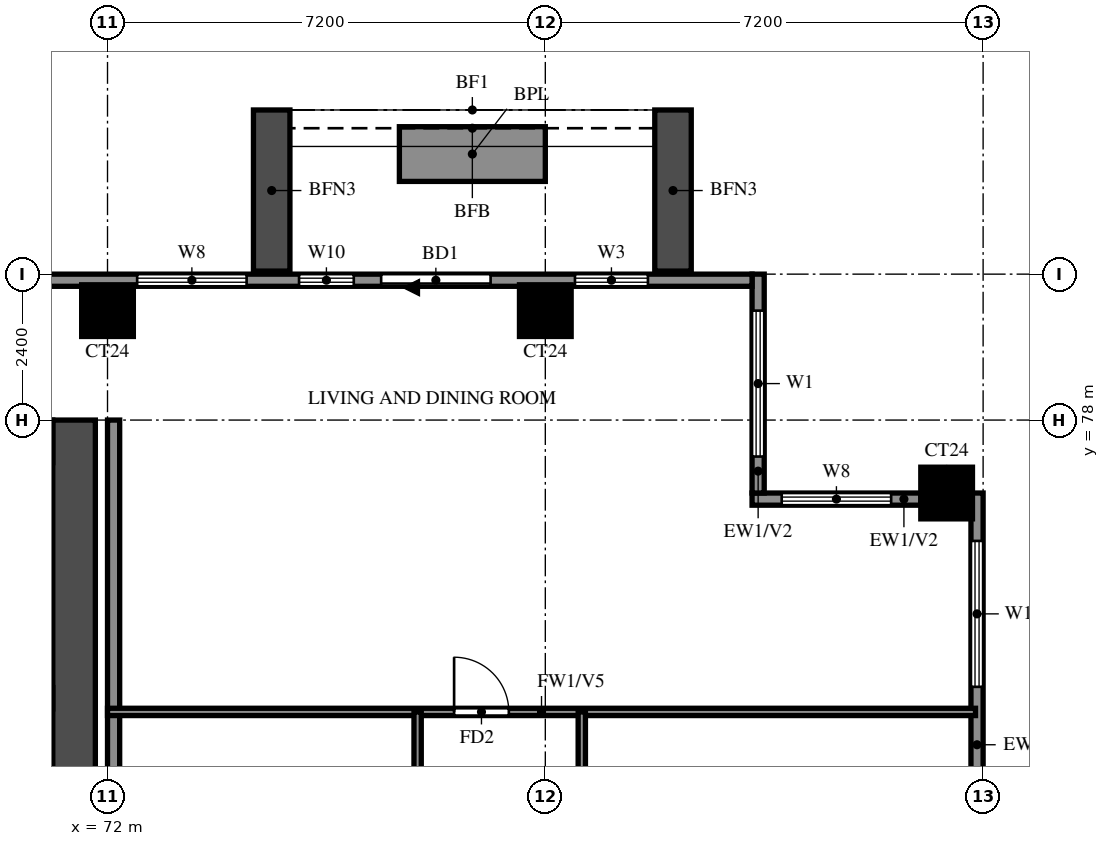
"""IFC4 building model, lengths in metres.
Left out: names, types, materials, properties, quantities, classifications, styles, units other than length and angle.
Written with IfcOpenShell. Run it as: python <this file> out.ifc"""

import sys

from ifc_helpers import new_model, si_unit, direction, frame, frame_2d, origin, origin_2d, place, context, subcontext, project, spatial, rectangle, extrude, source, transform, mapped, element, fill, save


model = new_model("IFC4")
c1 = context("Model", 3, precision=1e-05, world=origin(), true_north=direction((0.0, 1.0)))
c2 = subcontext(c1, "Body", "Model", "MODEL_VIEW")
j1 = project(units=[si_unit("LENGTHUNIT", "METRE"), si_unit("PLANEANGLEUNIT", "RADIAN")], contexts=[c1])
p1 = place(None, origin())
s1 = spatial("IfcSite", under=j1, at=p1, CompositionType="ELEMENT")
p2 = place(p1, origin())
s2 = spatial("IfcBuilding", under=s1, at=p2, CompositionType="ELEMENT")
p3 = place(p2, frame((0.0, 0.0, 171.0)))
s3 = spatial("IfcBuildingStorey", under=s2, at=p3, CompositionType="ELEMENT", Elevation=171.0)
m1 = source(origin(), c2, "Body", "SweptSolid", [
    extrude(rectangle(XDim=0.85, YDim=0.85, at=origin_2d()), origin(), (0.0, 0.0, 1.0), 3.2),
])
for number, where, z_axis, x_axis in (
    (1, (85.8, 76.8, 0.0), (0.0, 0.0, 1.0), (1.0, 0.0, 0.0)),
    (2, (72.0, 79.8, 0.0), (0.0, 0.0, 1.0), (1.0, 0.0, 0.0)),
    (3, (79.2, 79.8, 0.0), (0.0, 0.0, 1.0), (1.0, 0.0, 0.0)),
):
    element("IfcColumn", number, at=place(p3, frame(where, z_axis=z_axis, x_axis=x_axis)), inside=s3, PredefinedType="COLUMN", context=c2, shape_type="MappedRepresentation", body=[
        mapped(m1, transform((0.0, 0.0, 0.0))),
    ])
p4 = place(p3, frame((71.45, 66.1, 0.0), z_axis=(0.0, 0.0, 1.0), x_axis=(0.0, 1.0, 0.0)))
e4 = element("IfcWall", 4, at=p4, inside=s3, PredefinedType="SHEAR", context=c2, shape_type="SweptSolid", body=[
    extrude(rectangle(XDim=11.9, YDim=0.7, at=frame_2d((5.95, 0.0))), origin(), (0.0, 0.0, 1.0), 3.2),
])
p5 = place(p3, frame((29.7, 77.65, 0.0), z_axis=(0.0, 0.0, 1.0), x_axis=(1.0, 0.0, 0.0)))
e5 = element("IfcWall", 5, at=p5, inside=s3, PredefinedType="SHEAR", context=c2, shape_type="SweptSolid", body=[
    extrude(rectangle(XDim=41.4, YDim=0.7, at=frame_2d((20.7, 0.0))), origin(), (0.0, 0.0, 1.0), 3.2),
])
p6 = place(p3, frame((86.3, 69.6, 0.0), z_axis=(0.0, 0.0, 1.0), x_axis=(0.0, 1.0, 0.0)))
e6 = element("IfcWall", 6, at=p6, inside=s3, PredefinedType="SOLIDWALL", context=c2, shape_type="SweptSolid", body=[
    extrude(rectangle(XDim=7.2, YDim=0.2, at=frame_2d((3.6, 0.0))), origin(), (0.0, 0.0, 1.0), 3.2),
])
p7 = place(p6, frame((1.538, 0.0, 1.5)))
e7 = element("IfcOpeningElement", 7, at=p7, cuts=e6, PredefinedType="OPENING", context=c2, shape_type="SweptSolid", body=[
    extrude(rectangle(XDim=0.9, YDim=0.9, at=frame_2d((0.45, 0.45))), frame((0.0, 0.11, 0.0), z_axis=(0.0, -1.0, 0.0), x_axis=(1.0, 0.0, 0.0)), (0.0, 0.0, 1.0), 0.22),
])
p8 = place(p6, frame((4.012, 0.0, 0.6)))
e8 = element("IfcOpeningElement", 8, at=p8, cuts=e6, PredefinedType="OPENING", context=c2, shape_type="SweptSolid", body=[
    extrude(rectangle(XDim=2.4, YDim=2.4, at=frame_2d((1.2, 1.2))), frame((0.0, 0.11, 0.0), z_axis=(0.0, -1.0, 0.0), x_axis=(1.0, 0.0, 0.0)), (0.0, 0.0, 1.0), 0.22),
])
p9 = place(p3, frame((85.375, 76.7, 0.0), z_axis=(0.0, 0.0, 1.0), x_axis=(-1.0, 0.0, 0.0)))
e9 = element("IfcWall", 9, at=p9, inside=s3, PredefinedType="SOLIDWALL", context=c2, shape_type="SweptSolid", body=[
    extrude(rectangle(XDim=2.775, YDim=0.2, at=frame_2d((1.387, 0.0))), origin(), (0.0, 0.0, 1.0), 3.2),
])
p10 = place(p9, frame((0.488, 0.0, 0.6)))
e10 = element("IfcOpeningElement", 10, at=p10, cuts=e9, PredefinedType="OPENING", context=c2, shape_type="SweptSolid", body=[
    extrude(rectangle(XDim=1.8, YDim=2.4, at=frame_2d((0.9, 1.2))), frame((0.0, 0.11, 0.0), z_axis=(0.0, -1.0, 0.0), x_axis=(1.0, 0.0, 0.0)), (0.0, 0.0, 1.0), 0.22),
])
p11 = place(p3, frame((82.7, 76.8, 0.0), z_axis=(0.0, 0.0, 1.0), x_axis=(0.0, 1.0, 0.0)))
e11 = element("IfcWall", 11, at=p11, inside=s3, PredefinedType="SOLIDWALL", context=c2, shape_type="SweptSolid", body=[
    extrude(rectangle(XDim=3.6, YDim=0.2, at=frame_2d((1.8, 0.0))), origin(), (0.0, 0.0, 1.0), 3.2),
])
p12 = place(p11, frame((0.6, 0.0, 0.6)))
e12 = element("IfcOpeningElement", 12, at=p12, cuts=e11, PredefinedType="OPENING", context=c2, shape_type="SweptSolid", body=[
    extrude(rectangle(XDim=2.4, YDim=2.4, at=frame_2d((1.2, 1.2))), frame((0.0, 0.11, 0.0), z_axis=(0.0, -1.0, 0.0), x_axis=(1.0, 0.0, 0.0)), (0.0, 0.0, 1.0), 0.22),
])
p13 = place(p3, frame((82.6, 80.3, 0.0), z_axis=(0.0, 0.0, 1.0), x_axis=(-1.0, 0.0, 0.0)))
e13 = element("IfcWall", 13, at=p13, inside=s3, PredefinedType="SOLIDWALL", context=c2, shape_type="SweptSolid", body=[
    extrude(rectangle(XDim=64.6, YDim=0.2, at=frame_2d((32.3, 0.0))), origin(), (0.0, 0.0, 1.0), 3.2),
])
p14 = place(p13, frame((4.3, 0.0, 0.0)))
e14 = element("IfcOpeningElement", 14, at=p14, cuts=e13, PredefinedType="OPENING", context=c2, shape_type="SweptSolid", body=[
    extrude(rectangle(XDim=1.8, YDim=2.4, at=frame_2d((0.9, 1.2))), frame((0.0, 0.11, 0.0), z_axis=(0.0, -1.0, 0.0), x_axis=(1.0, 0.0, 0.0)), (0.0, 0.0, 1.0), 0.22),
])
p15 = place(p13, frame((54.758, 0.0, 0.6)))
e15 = element("IfcOpeningElement", 15, at=p15, cuts=e13, PredefinedType="OPENING", context=c2, shape_type="SweptSolid", body=[
    extrude(rectangle(XDim=2.4, YDim=2.4, at=frame_2d((1.2, 1.2))), frame((0.0, 0.11, 0.0), z_axis=(0.0, -1.0, 0.0), x_axis=(1.0, 0.0, 0.0)), (0.0, 0.0, 1.0), 0.22),
])
p16 = place(p13, frame((57.642, 0.0, 0.6)))
e16 = element("IfcOpeningElement", 16, at=p16, cuts=e13, PredefinedType="OPENING", context=c2, shape_type="SweptSolid", body=[
    extrude(rectangle(XDim=2.4, YDim=2.4, at=frame_2d((1.2, 1.2))), frame((0.0, 0.11, 0.0), z_axis=(0.0, -1.0, 0.0), x_axis=(1.0, 0.0, 0.0)), (0.0, 0.0, 1.0), 0.22),
])
p17 = place(p13, frame((61.988, 0.0, 0.6)))
e17 = element("IfcOpeningElement", 17, at=p17, cuts=e13, PredefinedType="OPENING", context=c2, shape_type="SweptSolid", body=[
    extrude(rectangle(XDim=1.8, YDim=2.4, at=frame_2d((0.9, 1.2))), frame((0.0, 0.11, 0.0), z_axis=(0.0, -1.0, 0.0), x_axis=(1.0, 0.0, 0.0)), (0.0, 0.0, 1.0), 0.22),
])
p18 = place(p13, frame((1.712, 0.0, 0.6)))
e18 = element("IfcOpeningElement", 18, at=p18, cuts=e13, PredefinedType="OPENING", context=c2, shape_type="SweptSolid", body=[
    extrude(rectangle(XDim=1.2, YDim=2.4, at=frame_2d((0.6, 1.2))), frame((0.0, 0.11, 0.0), z_axis=(0.0, -1.0, 0.0), x_axis=(1.0, 0.0, 0.0)), (0.0, 0.0, 1.0), 0.22),
])
p19 = place(p13, frame((6.55, 0.0, 0.6)))
e19 = element("IfcOpeningElement", 19, at=p19, cuts=e13, PredefinedType="OPENING", context=c2, shape_type="SweptSolid", body=[
    extrude(rectangle(XDim=0.9, YDim=2.4, at=frame_2d((0.45, 1.2))), frame((0.0, 0.11, 0.0), z_axis=(0.0, -1.0, 0.0), x_axis=(1.0, 0.0, 0.0)), (0.0, 0.0, 1.0), 0.22),
])
p20 = place(p13, frame((8.312, 0.0, 0.6)))
e20 = element("IfcOpeningElement", 20, at=p20, cuts=e13, PredefinedType="OPENING", context=c2, shape_type="SweptSolid", body=[
    extrude(rectangle(XDim=1.8, YDim=2.4, at=frame_2d((0.9, 1.2))), frame((0.0, 0.11, 0.0), z_axis=(0.0, -1.0, 0.0), x_axis=(1.0, 0.0, 0.0)), (0.0, 0.0, 1.0), 0.22),
])
for number, where, z_axis, x_axis in (
    (21, (81.3, 80.45, 0.0), (0.0, 0.0, 1.0), (0.0, 1.0, 0.0)),
    (22, (74.7, 80.45, 0.0), (0.0, 0.0, 1.0), (0.0, 1.0, 0.0)),
):
    element("IfcWall", number, at=place(p3, frame(where, z_axis=z_axis, x_axis=x_axis)), inside=s3, PredefinedType="SOLIDWALL", context=c2, shape_type="SweptSolid", body=[
        extrude(rectangle(XDim=2.65, YDim=0.6, at=frame_2d((1.325, 0.0))), origin(), (0.0, 0.0, 1.0), 2.85),
    ])
p21 = place(p3, frame((79.2, 82.375, 0.0), z_axis=(0.0, 0.0, 1.0), x_axis=(-1.0, 0.0, 0.0)))
e23 = element("IfcWall", 23, at=p21, inside=s3, PredefinedType="SOLIDWALL", context=c2, shape_type="SweptSolid", body=[
    extrude(rectangle(XDim=2.4, YDim=0.9, at=frame_2d((1.2, 0.0))), origin(), (0.0, 0.0, 1.0), 0.9),
])
p22 = place(p3, frame((72.1, 62.4, 0.0), z_axis=(0.0, 0.0, 1.0), x_axis=(0.0, 1.0, 0.0)))
e24 = element("IfcWall", 24, at=p22, inside=s3, PredefinedType="SOLIDWALL", context=c2, shape_type="SweptSolid", body=[
    extrude(rectangle(XDim=15.6, YDim=0.2, at=frame_2d((7.8, 0.0))), origin(), (0.0, 0.0, 1.0), 3.2),
])
p23 = place(p3, frame((72.0, 73.2, 0.0), z_axis=(0.0, 0.0, 1.0), x_axis=(1.0, 0.0, 0.0)))
e25 = element("IfcWall", 25, at=p23, inside=s3, PredefinedType="PARTITIONING", context=c2, shape_type="SweptSolid", body=[
    extrude(rectangle(XDim=14.275, YDim=0.12, at=frame_2d((7.137, 0.0))), origin(), (0.0, 0.0, 1.0), 2.3),
])
p24 = place(p23, frame((5.7, 0.0, 0.0)))
e26 = element("IfcOpeningElement", 26, at=p24, cuts=e25, PredefinedType="OPENING", context=c2, shape_type="SweptSolid", body=[
    extrude(rectangle(XDim=0.9, YDim=2.1, at=frame_2d((0.45, 1.05))), frame((0.0, 0.07, 0.0), z_axis=(0.0, -1.0, 0.0), x_axis=(1.0, 0.0, 0.0)), (0.0, 0.0, 1.0), 0.14),
])
p25 = place(p3, frame((77.1, 64.8, 0.0), z_axis=(0.0, 0.0, 1.0), x_axis=(0.0, 1.0, 0.0)))
e27 = element("IfcWall", 27, at=p25, inside=s3, PredefinedType="PARTITIONING", context=c2, shape_type="SweptSolid", body=[
    extrude(rectangle(XDim=8.4, YDim=0.12, at=frame_2d((4.2, 0.0))), origin(), (0.0, 0.0, 1.0), 3.2),
])
p26 = place(p25, frame((5.675, 0.0, 0.0)))
e28 = element("IfcOpeningElement", 28, at=p26, cuts=e27, PredefinedType="OPENING", context=c2, shape_type="SweptSolid", body=[
    extrude(rectangle(XDim=0.9, YDim=2.1, at=frame_2d((0.45, 1.05))), frame((0.0, 0.07, 0.0), z_axis=(0.0, -1.0, 0.0), x_axis=(1.0, 0.0, 0.0)), (0.0, 0.0, 1.0), 0.14),
])
p27 = place(p3, frame((79.8, 69.6, 0.0), z_axis=(0.0, 0.0, 1.0), x_axis=(0.0, 1.0, 0.0)))
e29 = element("IfcWall", 29, at=p27, inside=s3, PredefinedType="PARTITIONING", context=c2, shape_type="SweptSolid", body=[
    extrude(rectangle(XDim=3.6, YDim=0.12, at=frame_2d((1.8, 0.0))), origin(), (0.0, 0.0, 1.0), 3.2),
])
p28 = place(p8, origin())
e30 = element("IfcWindow", 30, at=p28, inside=s3, PartitioningType="DOUBLE_PANEL_VERTICAL", PredefinedType="WINDOW", context=c2, shape_type="SweptSolid", body=[
    extrude(rectangle(XDim=2.4, YDim=2.4, at=frame_2d((1.2, 1.2))), frame((0.0, 0.03, 0.0), z_axis=(0.0, -1.0, 0.0), x_axis=(1.0, 0.0, 0.0)), (0.0, 0.0, 1.0), 0.06),
])
fill(e8, e30)
p29 = place(p10, origin())
e31 = element("IfcWindow", 31, at=p29, inside=s3, PartitioningType="DOUBLE_PANEL_VERTICAL", PredefinedType="WINDOW", context=c2, shape_type="SweptSolid", body=[
    extrude(rectangle(XDim=1.8, YDim=2.4, at=frame_2d((0.9, 1.2))), frame((0.0, 0.03, 0.0), z_axis=(0.0, -1.0, 0.0), x_axis=(1.0, 0.0, 0.0)), (0.0, 0.0, 1.0), 0.06),
])
fill(e10, e31)
p30 = place(p12, origin())
e32 = element("IfcWindow", 32, at=p30, inside=s3, PartitioningType="DOUBLE_PANEL_VERTICAL", PredefinedType="WINDOW", context=c2, shape_type="SweptSolid", body=[
    extrude(rectangle(XDim=2.4, YDim=2.4, at=frame_2d((1.2, 1.2))), frame((0.0, 0.03, 0.0), z_axis=(0.0, -1.0, 0.0), x_axis=(1.0, 0.0, 0.0)), (0.0, 0.0, 1.0), 0.06),
])
fill(e12, e32)
p31 = place(p14, origin())
e33 = element("IfcDoor", 33, at=p31, inside=s3, OperationType="DOUBLE_DOOR_SLIDING", PredefinedType="DOOR", context=c2, shape_type="SweptSolid", body=[
    extrude(rectangle(XDim=1.8, YDim=2.4, at=frame_2d((0.9, 1.2))), frame((0.0, 0.025, 0.0), z_axis=(0.0, -1.0, 0.0), x_axis=(1.0, 0.0, 0.0)), (0.0, 0.0, 1.0), 0.05),
])
fill(e14, e33)
p32 = place(p18, origin())
e34 = element("IfcWindow", 34, at=p32, inside=s3, PartitioningType="SINGLE_PANEL", PredefinedType="WINDOW", context=c2, shape_type="SweptSolid", body=[
    extrude(rectangle(XDim=1.2, YDim=2.4, at=frame_2d((0.6, 1.2))), frame((0.0, 0.03, 0.0), z_axis=(0.0, -1.0, 0.0), x_axis=(1.0, 0.0, 0.0)), (0.0, 0.0, 1.0), 0.06),
])
fill(e18, e34)
p33 = place(p19, origin())
e35 = element("IfcWindow", 35, at=p33, inside=s3, PartitioningType="SINGLE_PANEL", PredefinedType="WINDOW", context=c2, shape_type="SweptSolid", body=[
    extrude(rectangle(XDim=0.9, YDim=2.4, at=frame_2d((0.45, 1.2))), frame((0.0, 0.03, 0.0), z_axis=(0.0, -1.0, 0.0), x_axis=(1.0, 0.0, 0.0)), (0.0, 0.0, 1.0), 0.06),
])
fill(e19, e35)
p34 = place(p20, origin())
e36 = element("IfcWindow", 36, at=p34, inside=s3, PartitioningType="DOUBLE_PANEL_VERTICAL", PredefinedType="WINDOW", context=c2, shape_type="SweptSolid", body=[
    extrude(rectangle(XDim=1.8, YDim=2.4, at=frame_2d((0.9, 1.2))), frame((0.0, 0.03, 0.0), z_axis=(0.0, -1.0, 0.0), x_axis=(1.0, 0.0, 0.0)), (0.0, 0.0, 1.0), 0.06),
])
fill(e20, e36)
p35 = place(p24, origin())
e37 = element("IfcDoor", 37, at=p35, inside=s3, OperationType="SINGLE_SWING_LEFT", PredefinedType="DOOR", context=c2, shape_type="SweptSolid", body=[
    extrude(rectangle(XDim=0.9, YDim=2.1, at=frame_2d((0.45, 1.05))), frame((0.0, 0.025, 0.0), z_axis=(0.0, -1.0, 0.0), x_axis=(1.0, 0.0, 0.0)), (0.0, 0.0, 1.0), 0.05),
])
fill(e26, e37)
save(model, sys.argv[1])
